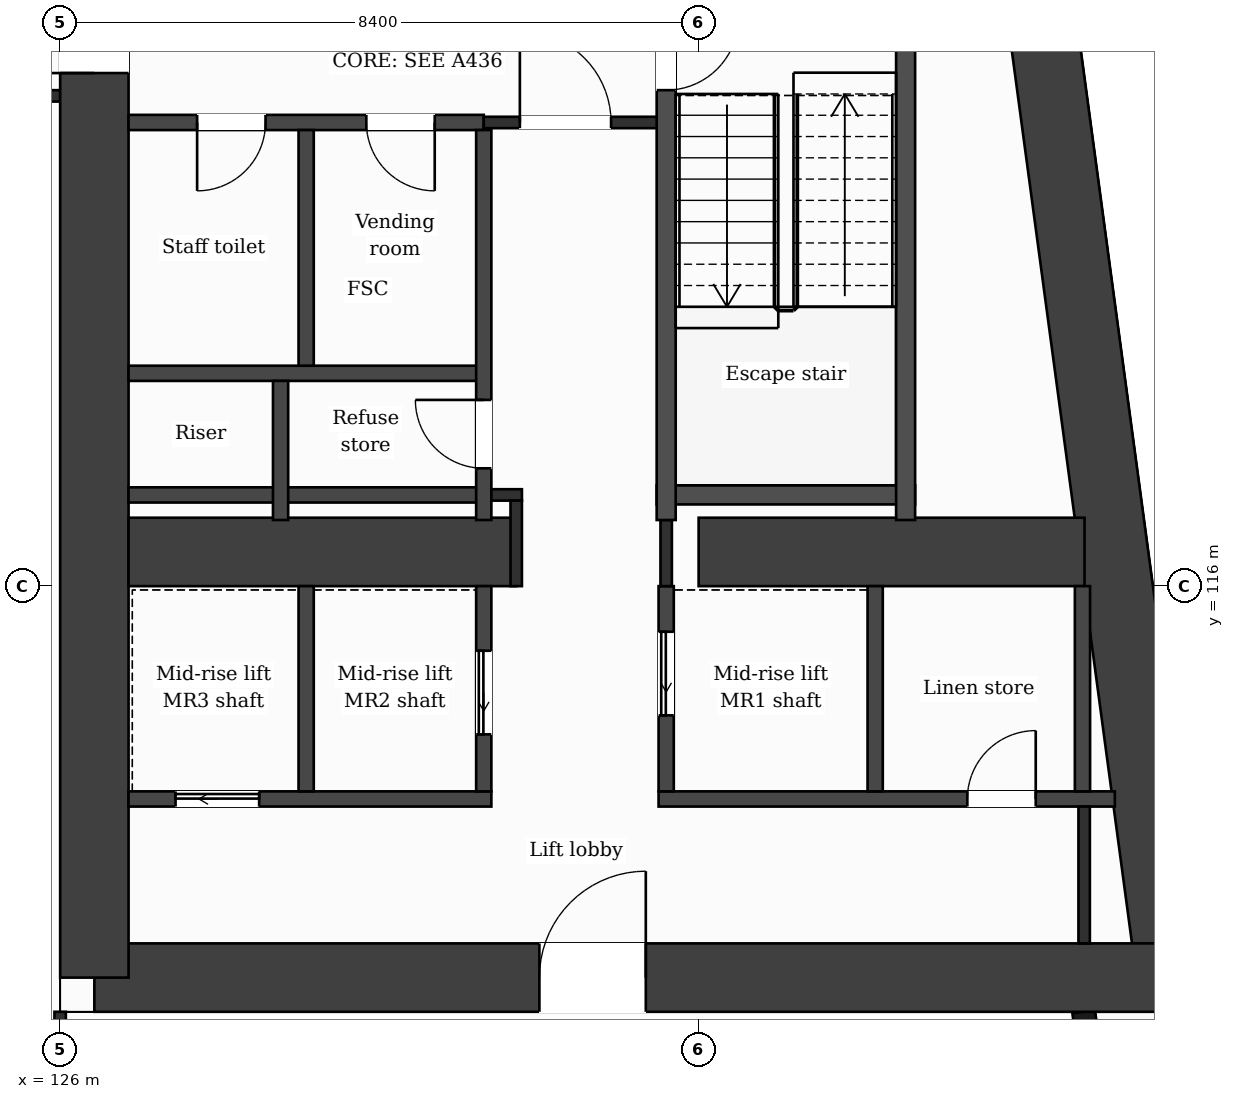
"""IFC4 building model, lengths in metres.
Left out: names, types, materials, properties, quantities, classifications, styles, units other than length and angle.
Written with IfcOpenShell. Run it as: python <this file> out.ifc"""

import sys

from ifc_helpers import new_model, si_unit, direction, frame, frame_2d, origin, place, context, subcontext, project, spatial, rectangle, extrude, element, fill, save


model = new_model("IFC4")
c1 = context("Model", 3, precision=1e-05, world=origin(), true_north=direction((0.0, 1.0)))
c2 = subcontext(c1, "Body", "Model", "MODEL_VIEW")
j1 = project(units=[si_unit("LENGTHUNIT", "METRE"), si_unit("PLANEANGLEUNIT", "RADIAN")], contexts=[c1])
p1 = place(None, origin())
s1 = spatial("IfcSite", under=j1, at=p1, CompositionType="ELEMENT")
p2 = place(p1, origin())
s2 = spatial("IfcBuilding", under=s1, at=p2, CompositionType="ELEMENT")
p3 = place(p2, frame((0.0, 0.0, 151.5)))
s3 = spatial("IfcBuildingStorey", under=s2, at=p3, CompositionType="ELEMENT", Elevation=151.5)
p4 = place(p3, frame((137.776, 131.95, 0.0), z_axis=(0.0, 0.0, 1.0), x_axis=(0.133421759112, -0.991059349482, 0.0)))
e1 = element("IfcWall", 1, at=p4, inside=s3, PredefinedType="SHEAR", context=c2, shape_type="SweptSolid", body=[
    extrude(rectangle(XDim=21.29, YDim=0.9, at=frame_2d((10.645, 0.0))), origin(), (0.0, 0.0, 1.0), 3.7),
])
p5 = place(p3, frame((140.616, 110.85, 0.0), z_axis=(0.0, 0.0, 1.0), x_axis=(-1.0, 0.0, 0.0)))
e2 = element("IfcWall", 2, at=p5, inside=s3, PredefinedType="SHEAR", context=c2, shape_type="SweptSolid", body=[
    extrude(rectangle(XDim=14.166, YDim=0.9, at=frame_2d((7.083, 0.0))), origin(), (0.0, 0.0, 1.0), 3.7),
])
p6 = place(p5, frame((6.911, 0.0, 0.0)))
e3 = element("IfcOpeningElement", 3, at=p6, cuts=e2, PredefinedType="OPENING", context=c2, shape_type="SweptSolid", body=[
    extrude(rectangle(XDim=1.4, YDim=2.1, at=frame_2d((0.7, 1.05))), frame((0.0, 0.46, 0.0), z_axis=(0.0, -1.0, 0.0), x_axis=(1.0, 0.0, 0.0)), (0.0, 0.0, 1.0), 0.92),
])
p7 = place(p3, frame((126.45, 110.85, 0.0), z_axis=(0.0, 0.0, 1.0), x_axis=(0.0, 1.0, 0.0)))
e4 = element("IfcWall", 4, at=p7, inside=s3, PredefinedType="SHEAR", context=c2, shape_type="SweptSolid", body=[
    extrude(rectangle(XDim=21.1, YDim=0.9, at=frame_2d((10.55, 0.0))), origin(), (0.0, 0.0, 1.0), 3.7),
])
p8 = place(p7, frame((11.9, 0.0, 0.0)))
e5 = element("IfcOpeningElement", 5, at=p8, cuts=e4, PredefinedType="OPENING", context=c2, shape_type="SweptSolid", body=[
    extrude(rectangle(XDim=1.4, YDim=2.1, at=frame_2d((0.7, 1.05))), frame((0.0, 0.46, 0.0), z_axis=(0.0, -1.0, 0.0), x_axis=(1.0, 0.0, 0.0)), (0.0, 0.0, 1.0), 0.92),
])
p9 = place(p3, frame((126.9, 116.45, 0.0), z_axis=(0.0, 0.0, 1.0), x_axis=(1.0, 0.0, 0.0)))
e6 = element("IfcWall", 6, at=p9, inside=s3, PredefinedType="SHEAR", context=c2, shape_type="SweptSolid", body=[
    extrude(rectangle(XDim=5.1, YDim=0.9, at=frame_2d((2.55, 0.0))), origin(), (0.0, 0.0, 1.0), 3.7),
])
p10 = place(p3, frame((134.4, 116.45, 0.0), z_axis=(0.0, 0.0, 1.0), x_axis=(1.0, 0.0, 0.0)))
e7 = element("IfcWall", 7, at=p10, inside=s3, PredefinedType="SHEAR", context=c2, shape_type="SweptSolid", body=[
    extrude(rectangle(XDim=5.077, YDim=0.9, at=frame_2d((2.539, 0.0))), origin(), (0.0, 0.0, 1.0), 3.7),
])
p11 = place(p3, frame((140.348, 103.85, 0.0), z_axis=(0.0, 0.0, 1.0), x_axis=(-0.133431549479, 0.991058031401, 0.0)))
e8 = element("IfcWall", 8, at=p11, inside=s3, PredefinedType="SOLIDWALL", context=c2, shape_type="SweptSolid", body=[
    extrude(rectangle(XDim=6.609, YDim=0.3, at=frame_2d((3.304, 0.0))), origin(), (0.0, 0.0, 1.0), 3.38),
])
p12 = place(p11, frame((0.737, 0.0, 0.9)))
e9 = element("IfcOpeningElement", 9, at=p12, cuts=e8, PredefinedType="OPENING", context=c2, shape_type="SweptSolid", body=[
    extrude(rectangle(XDim=1.2, YDim=2.1, at=frame_2d((0.6, 1.05))), frame((0.0, 0.16, 0.0), z_axis=(0.0, -1.0, 0.0), x_axis=(1.0, 0.0, 0.0)), (0.0, 0.0, 1.0), 0.32),
])
p13 = place(p11, frame((3.991, 0.0, 0.0)))
e10 = element("IfcOpeningElement", 10, at=p13, cuts=e8, PredefinedType="OPENING", context=c2, shape_type="SweptSolid", body=[
    extrude(rectangle(XDim=1.2, YDim=2.4, at=frame_2d((0.6, 1.2))), frame((0.0, 0.16, 0.0), z_axis=(0.0, -1.0, 0.0), x_axis=(1.0, 0.0, 0.0)), (0.0, 0.0, 1.0), 0.32),
])
p14 = place(p3, frame((126.9, 113.2, 0.0), z_axis=(0.0, 0.0, 1.0), x_axis=(1.0, 0.0, 0.0)))
e11 = element("IfcWall", 11, at=p14, inside=s3, PredefinedType="PARTITIONING", context=c2, shape_type="SweptSolid", body=[
    extrude(rectangle(XDim=4.773, YDim=0.2, at=frame_2d((2.387, 0.0))), origin(), (0.0, 0.0, 1.0), 3.38),
])
p15 = place(p14, frame((0.618, 0.0, 0.0)))
e12 = element("IfcOpeningElement", 12, at=p15, cuts=e11, PredefinedType="OPENING", context=c2, shape_type="SweptSolid", body=[
    extrude(rectangle(XDim=1.1, YDim=2.1, at=frame_2d((0.55, 1.05))), frame((0.0, 0.11, 0.0), z_axis=(0.0, -1.0, 0.0), x_axis=(1.0, 0.0, 0.0)), (0.0, 0.0, 1.0), 0.22),
])
p16 = place(p3, frame((133.873, 113.2, 0.0), z_axis=(0.0, 0.0, 1.0), x_axis=(1.0, 0.0, 0.0)))
e13 = element("IfcWall", 13, at=p16, inside=s3, PredefinedType="PARTITIONING", context=c2, shape_type="SweptSolid", body=[
    extrude(rectangle(XDim=6.003, YDim=0.2, at=frame_2d((3.001, 0.0))), origin(), (0.0, 0.0, 1.0), 3.38),
])
p17 = place(p16, frame((4.062, 0.0, 0.0)))
e14 = element("IfcOpeningElement", 14, at=p17, cuts=e13, PredefinedType="OPENING", context=c2, shape_type="SweptSolid", body=[
    extrude(rectangle(XDim=0.9, YDim=2.1, at=frame_2d((0.45, 1.05))), frame((0.0, 0.11, 0.0), z_axis=(0.0, -1.0, 0.0), x_axis=(1.0, 0.0, 0.0)), (0.0, 0.0, 1.0), 0.22),
])
p18 = place(p3, frame((126.9, 117.2, 0.0), z_axis=(0.0, 0.0, 1.0), x_axis=(1.0, 0.0, 0.0)))
e15 = element("IfcWall", 15, at=p18, inside=s3, PredefinedType="PARTITIONING", context=c2, shape_type="SweptSolid", body=[
    extrude(rectangle(XDim=4.673, YDim=0.2, at=frame_2d((2.336, 0.0))), origin(), (0.0, 0.0, 1.0), 3.38),
])
p19 = place(p3, frame((131.573, 117.2, 0.0), z_axis=(0.0, 0.0, 1.0), x_axis=(1.0, 0.0, 0.0)))
e16 = element("IfcWall", 16, at=p19, inside=s3, PredefinedType="PARTITIONING", context=c2, shape_type="SweptSolid", body=[
    extrude(rectangle(XDim=0.502, YDim=0.15, at=frame_2d((0.251, 0.0))), origin(), (0.0, 0.0, 1.0), 3.38),
])
p20 = place(p3, frame((133.848, 117.2, 0.0), z_axis=(0.0, 0.0, 1.0), x_axis=(1.0, 0.0, 0.0)))
e17 = element("IfcWall", 17, at=p20, inside=s3, PredefinedType="PARTITIONING", context=c2, shape_type="SweptSolid", body=[
    extrude(rectangle(XDim=3.4, YDim=0.25, at=frame_2d((1.7, 0.0))), origin(), (0.0, 0.0, 1.0), 3.38),
])
p21 = place(p3, frame((126.9, 118.8, 0.0), z_axis=(0.0, 0.0, 1.0), x_axis=(1.0, 0.0, 0.0)))
e18 = element("IfcWall", 18, at=p21, inside=s3, PredefinedType="PARTITIONING", context=c2, shape_type="SweptSolid", body=[
    extrude(rectangle(XDim=4.673, YDim=0.2, at=frame_2d((2.336, 0.0))), origin(), (0.0, 0.0, 1.0), 3.38),
])
p22 = place(p3, frame((126.9, 122.1, 0.0), z_axis=(0.0, 0.0, 1.0), x_axis=(1.0, 0.0, 0.0)))
e19 = element("IfcWall", 19, at=p22, inside=s3, PredefinedType="PARTITIONING", context=c2, shape_type="SweptSolid", body=[
    extrude(rectangle(XDim=4.673, YDim=0.2, at=frame_2d((2.336, 0.0))), origin(), (0.0, 0.0, 1.0), 3.38),
])
p23 = place(p22, frame((3.128, 0.0, 0.0)))
e20 = element("IfcOpeningElement", 20, at=p23, cuts=e19, PredefinedType="OPENING", context=c2, shape_type="SweptSolid", body=[
    extrude(rectangle(XDim=0.9, YDim=2.1, at=frame_2d((0.45, 1.05))), frame((0.0, 0.11, 0.0), z_axis=(0.0, -1.0, 0.0), x_axis=(1.0, 0.0, 0.0)), (0.0, 0.0, 1.0), 0.22),
])
p24 = place(p22, frame((0.902, 0.0, 0.0)))
e21 = element("IfcOpeningElement", 21, at=p24, cuts=e19, PredefinedType="OPENING", context=c2, shape_type="SweptSolid", body=[
    extrude(rectangle(XDim=0.9, YDim=2.1, at=frame_2d((0.45, 1.05))), frame((0.0, 0.11, 0.0), z_axis=(0.0, -1.0, 0.0), x_axis=(1.0, 0.0, 0.0)), (0.0, 0.0, 1.0), 0.22),
])
p25 = place(p3, frame((131.573, 122.1, 0.0), z_axis=(0.0, 0.0, 1.0), x_axis=(1.0, 0.0, 0.0)))
e22 = element("IfcWall", 22, at=p25, inside=s3, PredefinedType="PARTITIONING", context=c2, shape_type="SweptSolid", body=[
    extrude(rectangle(XDim=2.4, YDim=0.15, at=frame_2d((1.2, 0.0))), origin(), (0.0, 0.0, 1.0), 3.38),
])
p26 = place(p25, frame((0.475, 0.0, 0.0)))
e23 = element("IfcOpeningElement", 23, at=p26, cuts=e22, PredefinedType="OPENING", context=c2, shape_type="SweptSolid", body=[
    extrude(rectangle(XDim=1.2, YDim=2.1, at=frame_2d((0.6, 1.05))), frame((0.0, 0.085, 0.0), z_axis=(0.0, -1.0, 0.0), x_axis=(1.0, 0.0, 0.0)), (0.0, 0.0, 1.0), 0.17),
])
p27 = place(p3, frame((100.8, 122.45, 0.0), z_axis=(0.0, 0.0, 1.0), x_axis=(1.0, 0.0, 0.0)))
e24 = element("IfcWall", 24, at=p27, inside=s3, PredefinedType="PARTITIONING", context=c2, shape_type="SweptSolid", body=[
    extrude(rectangle(XDim=25.2, YDim=0.15, at=frame_2d((12.6, 0.0))), origin(), (0.0, 0.0, 1.0), 3.38),
])
p28 = place(p3, frame((126.0, 109.075, 0.0), z_axis=(0.0, 0.0, 1.0), x_axis=(0.0, 1.0, 0.0)))
e25 = element("IfcWall", 25, at=p28, inside=s3, PredefinedType="PARTITIONING", context=c2, shape_type="SweptSolid", body=[
    extrude(rectangle(XDim=1.325, YDim=0.15, at=frame_2d((0.663, 0.0))), origin(), (0.0, 0.0, 1.0), 3.38),
])
p29 = place(p3, frame((128.9, 116.87, 0.0), z_axis=(0.0, 0.0, 1.0), x_axis=(0.0, 1.0, 0.0)))
e26 = element("IfcWall", 26, at=p29, inside=s3, PredefinedType="PARTITIONING", context=c2, shape_type="SweptSolid", body=[
    extrude(rectangle(XDim=1.83, YDim=0.2, at=frame_2d((0.915, 0.0))), origin(), (0.0, 0.0, 1.0), 3.38),
])
p30 = place(p3, frame((129.237, 113.3, 0.0), z_axis=(0.0, 0.0, 1.0), x_axis=(0.0, 1.0, 0.0)))
e27 = element("IfcWall", 27, at=p30, inside=s3, PredefinedType="PARTITIONING", context=c2, shape_type="SweptSolid", body=[
    extrude(rectangle(XDim=2.7, YDim=0.2, at=frame_2d((1.35, 0.0))), origin(), (0.0, 0.0, 1.0), 3.38),
])
p31 = place(p3, frame((129.237, 118.9, 0.0), z_axis=(0.0, 0.0, 1.0), x_axis=(0.0, 1.0, 0.0)))
e28 = element("IfcWall", 28, at=p31, inside=s3, PredefinedType="PARTITIONING", context=c2, shape_type="SweptSolid", body=[
    extrude(rectangle(XDim=3.1, YDim=0.2, at=frame_2d((1.55, 0.0))), origin(), (0.0, 0.0, 1.0), 3.38),
])
p32 = place(p3, frame((131.573, 113.3, 0.0), z_axis=(0.0, 0.0, 1.0), x_axis=(0.0, 1.0, 0.0)))
e29 = element("IfcWall", 29, at=p32, inside=s3, PredefinedType="PARTITIONING", context=c2, shape_type="SweptSolid", body=[
    extrude(rectangle(XDim=2.7, YDim=0.2, at=frame_2d((1.35, 0.0))), origin(), (0.0, 0.0, 1.0), 3.38),
])
p33 = place(p32, frame((0.75, 0.0, 0.0)))
e30 = element("IfcOpeningElement", 30, at=p33, cuts=e29, PredefinedType="OPENING", context=c2, shape_type="SweptSolid", body=[
    extrude(rectangle(XDim=1.1, YDim=2.1, at=frame_2d((0.55, 1.05))), frame((0.0, 0.11, 0.0), z_axis=(0.0, -1.0, 0.0), x_axis=(1.0, 0.0, 0.0)), (0.0, 0.0, 1.0), 0.22),
])
p34 = place(p3, frame((131.573, 116.87, 0.0), z_axis=(0.0, 0.0, 1.0), x_axis=(0.0, 1.0, 0.0)))
e31 = element("IfcWall", 31, at=p34, inside=s3, PredefinedType="PARTITIONING", context=c2, shape_type="SweptSolid", body=[
    extrude(rectangle(XDim=5.13, YDim=0.2, at=frame_2d((2.565, 0.0))), origin(), (0.0, 0.0, 1.0), 3.38),
])
p35 = place(p34, frame((0.68, 0.0, 0.0)))
e32 = element("IfcOpeningElement", 32, at=p35, cuts=e31, PredefinedType="OPENING", context=c2, shape_type="SweptSolid", body=[
    extrude(rectangle(XDim=0.9, YDim=2.1, at=frame_2d((0.45, 1.05))), frame((0.0, 0.11, 0.0), z_axis=(0.0, -1.0, 0.0), x_axis=(1.0, 0.0, 0.0)), (0.0, 0.0, 1.0), 0.22),
])
p36 = place(p3, frame((132.0, 116.0, 0.0), z_axis=(0.0, 0.0, 1.0), x_axis=(0.0, 1.0, 0.0)))
e33 = element("IfcWall", 33, at=p36, inside=s3, PredefinedType="PARTITIONING", context=c2, shape_type="SweptSolid", body=[
    extrude(rectangle(XDim=1.125, YDim=0.15, at=frame_2d((0.562, 0.0))), origin(), (0.0, 0.0, 1.0), 3.38),
])
p37 = place(p3, frame((133.973, 113.3, 0.0), z_axis=(0.0, 0.0, 1.0), x_axis=(0.0, 1.0, 0.0)))
e34 = element("IfcWall", 34, at=p37, inside=s3, PredefinedType="PARTITIONING", context=c2, shape_type="SweptSolid", body=[
    extrude(rectangle(XDim=2.7, YDim=0.2, at=frame_2d((1.35, 0.0))), origin(), (0.0, 0.0, 1.0), 3.38),
])
p38 = place(p37, frame((1.0, 0.0, 0.0)))
e35 = element("IfcOpeningElement", 35, at=p38, cuts=e34, PredefinedType="OPENING", context=c2, shape_type="SweptSolid", body=[
    extrude(rectangle(XDim=1.1, YDim=2.1, at=frame_2d((0.55, 1.05))), frame((0.0, 0.11, 0.0), z_axis=(0.0, -1.0, 0.0), x_axis=(1.0, 0.0, 0.0)), (0.0, 0.0, 1.0), 0.22),
])
p39 = place(p3, frame((133.973, 116.0, 0.0), z_axis=(0.0, 0.0, 1.0), x_axis=(0.0, 1.0, 0.0)))
e36 = element("IfcWall", 36, at=p39, inside=s3, PredefinedType="PARTITIONING", context=c2, shape_type="SweptSolid", body=[
    extrude(rectangle(XDim=0.87, YDim=0.15, at=frame_2d((0.435, 0.0))), origin(), (0.0, 0.0, 1.0), 3.38),
])
p40 = place(p3, frame((133.973, 116.87, 0.0), z_axis=(0.0, 0.0, 1.0), x_axis=(0.0, 1.0, 0.0)))
e37 = element("IfcWall", 37, at=p40, inside=s3, PredefinedType="PARTITIONING", context=c2, shape_type="SweptSolid", body=[
    extrude(rectangle(XDim=6.955, YDim=0.25, at=frame_2d((3.478, 0.0))), origin(), (0.0, 0.0, 1.0), 3.38),
])
p41 = place(p40, frame((5.655, 0.0, 0.0)))
e38 = element("IfcOpeningElement", 38, at=p41, cuts=e37, PredefinedType="OPENING", context=c2, shape_type="SweptSolid", body=[
    extrude(rectangle(XDim=0.95, YDim=2.1, at=frame_2d((0.475, 1.05))), frame((0.0, 0.135, 0.0), z_axis=(0.0, -1.0, 0.0), x_axis=(1.0, 0.0, 0.0)), (0.0, 0.0, 1.0), 0.27),
])
p42 = place(p3, frame((136.722, 113.3, 0.0), z_axis=(0.0, 0.0, 1.0), x_axis=(0.0, 1.0, 0.0)))
e39 = element("IfcWall", 39, at=p42, inside=s3, PredefinedType="PARTITIONING", context=c2, shape_type="SweptSolid", body=[
    extrude(rectangle(XDim=2.7, YDim=0.2, at=frame_2d((1.35, 0.0))), origin(), (0.0, 0.0, 1.0), 3.38),
])
p43 = place(p3, frame((137.123, 116.87, 0.0), z_axis=(0.0, 0.0, 1.0), x_axis=(0.0, 1.0, 0.0)))
e40 = element("IfcWall", 40, at=p43, inside=s3, PredefinedType="PARTITIONING", context=c2, shape_type="SweptSolid", body=[
    extrude(rectangle(XDim=6.955, YDim=0.25, at=frame_2d((3.478, 0.0))), origin(), (0.0, 0.0, 1.0), 3.38),
])
p44 = place(p3, frame((139.45, 113.3, 0.0), z_axis=(0.0, 0.0, 1.0), x_axis=(0.0, 1.0, 0.0)))
e41 = element("IfcWall", 41, at=p44, inside=s3, PredefinedType="PARTITIONING", context=c2, shape_type="SweptSolid", body=[
    extrude(rectangle(XDim=2.7, YDim=0.2, at=frame_2d((1.35, 0.0))), origin(), (0.0, 0.0, 1.0), 3.38),
])
p45 = place(p3, frame((139.472, 111.3, 0.0), z_axis=(0.0, 0.0, 1.0), x_axis=(0.0, 1.0, 0.0)))
e42 = element("IfcWall", 42, at=p45, inside=s3, PredefinedType="PARTITIONING", context=c2, shape_type="SweptSolid", body=[
    extrude(rectangle(XDim=1.8, YDim=0.15, at=frame_2d((0.9, 0.0))), origin(), (0.0, 0.0, 1.0), 3.38),
])
p46 = place(p26, origin())
e43 = element("IfcDoor", 43, at=p46, inside=s3, OperationType="SINGLE_SWING_LEFT", PredefinedType="DOOR", context=c2, shape_type="SweptSolid", body=[
    extrude(rectangle(XDim=1.2, YDim=2.1, at=frame_2d((0.6, 1.05))), frame((0.0, 0.025, 0.0), z_axis=(0.0, -1.0, 0.0), x_axis=(1.0, 0.0, 0.0)), (0.0, 0.0, 1.0), 0.05),
])
fill(e23, e43)
p47 = place(p23, origin())
e44 = element("IfcDoor", 44, at=p47, inside=s3, OperationType="SINGLE_SWING_RIGHT", PredefinedType="DOOR", context=c2, shape_type="SweptSolid", body=[
    extrude(rectangle(XDim=0.9, YDim=2.1, at=frame_2d((0.45, 1.05))), frame((0.0, 0.025, 0.0), z_axis=(0.0, -1.0, 0.0), x_axis=(1.0, 0.0, 0.0)), (0.0, 0.0, 1.0), 0.05),
])
fill(e20, e44)
p48 = place(p24, origin())
e45 = element("IfcDoor", 45, at=p48, inside=s3, OperationType="SINGLE_SWING_LEFT", PredefinedType="DOOR", context=c2, shape_type="SweptSolid", body=[
    extrude(rectangle(XDim=0.9, YDim=2.1, at=frame_2d((0.45, 1.05))), frame((0.0, 0.025, 0.0), z_axis=(0.0, -1.0, 0.0), x_axis=(1.0, 0.0, 0.0)), (0.0, 0.0, 1.0), 0.05),
])
fill(e21, e45)
p49 = place(p41, origin())
e46 = element("IfcDoor", 46, at=p49, inside=s3, OperationType="SINGLE_SWING_RIGHT", PredefinedType="DOOR", context=c2, shape_type="SweptSolid", body=[
    extrude(rectangle(XDim=0.95, YDim=2.1, at=frame_2d((0.475, 1.05))), frame((0.0, 0.025, 0.0), z_axis=(0.0, -1.0, 0.0), x_axis=(1.0, 0.0, 0.0)), (0.0, 0.0, 1.0), 0.05),
])
fill(e38, e46)
p50 = place(p35, origin())
e47 = element("IfcDoor", 47, at=p50, inside=s3, OperationType="SINGLE_SWING_RIGHT", PredefinedType="DOOR", context=c2, shape_type="SweptSolid", body=[
    extrude(rectangle(XDim=0.9, YDim=2.1, at=frame_2d((0.45, 1.05))), frame((0.0, 0.025, 0.0), z_axis=(0.0, -1.0, 0.0), x_axis=(1.0, 0.0, 0.0)), (0.0, 0.0, 1.0), 0.05),
])
fill(e32, e47)
p51 = place(p38, origin())
e48 = element("IfcDoor", 48, at=p51, inside=s3, OperationType="SLIDING_TO_LEFT", PredefinedType="DOOR", context=c2, shape_type="SweptSolid", body=[
    extrude(rectangle(XDim=1.1, YDim=2.1, at=frame_2d((0.55, 1.05))), frame((0.0, 0.025, 0.0), z_axis=(0.0, -1.0, 0.0), x_axis=(1.0, 0.0, 0.0)), (0.0, 0.0, 1.0), 0.05),
])
fill(e35, e48)
p52 = place(p33, origin())
e49 = element("IfcDoor", 49, at=p52, inside=s3, OperationType="SLIDING_TO_LEFT", PredefinedType="DOOR", context=c2, shape_type="SweptSolid", body=[
    extrude(rectangle(XDim=1.1, YDim=2.1, at=frame_2d((0.55, 1.05))), frame((0.0, 0.025, 0.0), z_axis=(0.0, -1.0, 0.0), x_axis=(1.0, 0.0, 0.0)), (0.0, 0.0, 1.0), 0.05),
])
fill(e30, e49)
p53 = place(p15, origin())
e50 = element("IfcDoor", 50, at=p53, inside=s3, OperationType="SLIDING_TO_LEFT", PredefinedType="DOOR", context=c2, shape_type="SweptSolid", body=[
    extrude(rectangle(XDim=1.1, YDim=2.1, at=frame_2d((0.55, 1.05))), frame((0.0, 0.025, 0.0), z_axis=(0.0, -1.0, 0.0), x_axis=(1.0, 0.0, 0.0)), (0.0, 0.0, 1.0), 0.05),
])
fill(e12, e50)
p54 = place(p17, origin())
e51 = element("IfcDoor", 51, at=p54, inside=s3, OperationType="SINGLE_SWING_RIGHT", PredefinedType="DOOR", context=c2, shape_type="SweptSolid", body=[
    extrude(rectangle(XDim=0.9, YDim=2.1, at=frame_2d((0.45, 1.05))), frame((0.0, 0.025, 0.0), z_axis=(0.0, -1.0, 0.0), x_axis=(1.0, 0.0, 0.0)), (0.0, 0.0, 1.0), 0.05),
])
fill(e14, e51)
p55 = place(p6, origin())
e52 = element("IfcDoor", 52, at=p55, inside=s3, OperationType="SINGLE_SWING_LEFT", PredefinedType="DOOR", context=c2, shape_type="SweptSolid", body=[
    extrude(rectangle(XDim=1.4, YDim=2.1, at=frame_2d((0.7, 1.05))), frame((0.0, 0.025, 0.0), z_axis=(0.0, -1.0, 0.0), x_axis=(1.0, 0.0, 0.0)), (0.0, 0.0, 1.0), 0.05),
])
fill(e3, e52)
p56 = place(p8, origin())
e53 = element("IfcDoor", 53, at=p56, inside=s3, OperationType="SINGLE_SWING_LEFT", PredefinedType="DOOR", context=c2, shape_type="SweptSolid", body=[
    extrude(rectangle(XDim=1.4, YDim=2.1, at=frame_2d((0.7, 1.05))), frame((0.0, 0.025, 0.0), z_axis=(0.0, -1.0, 0.0), x_axis=(1.0, 0.0, 0.0)), (0.0, 0.0, 1.0), 0.05),
])
fill(e5, e53)
save(model, sys.argv[1])
